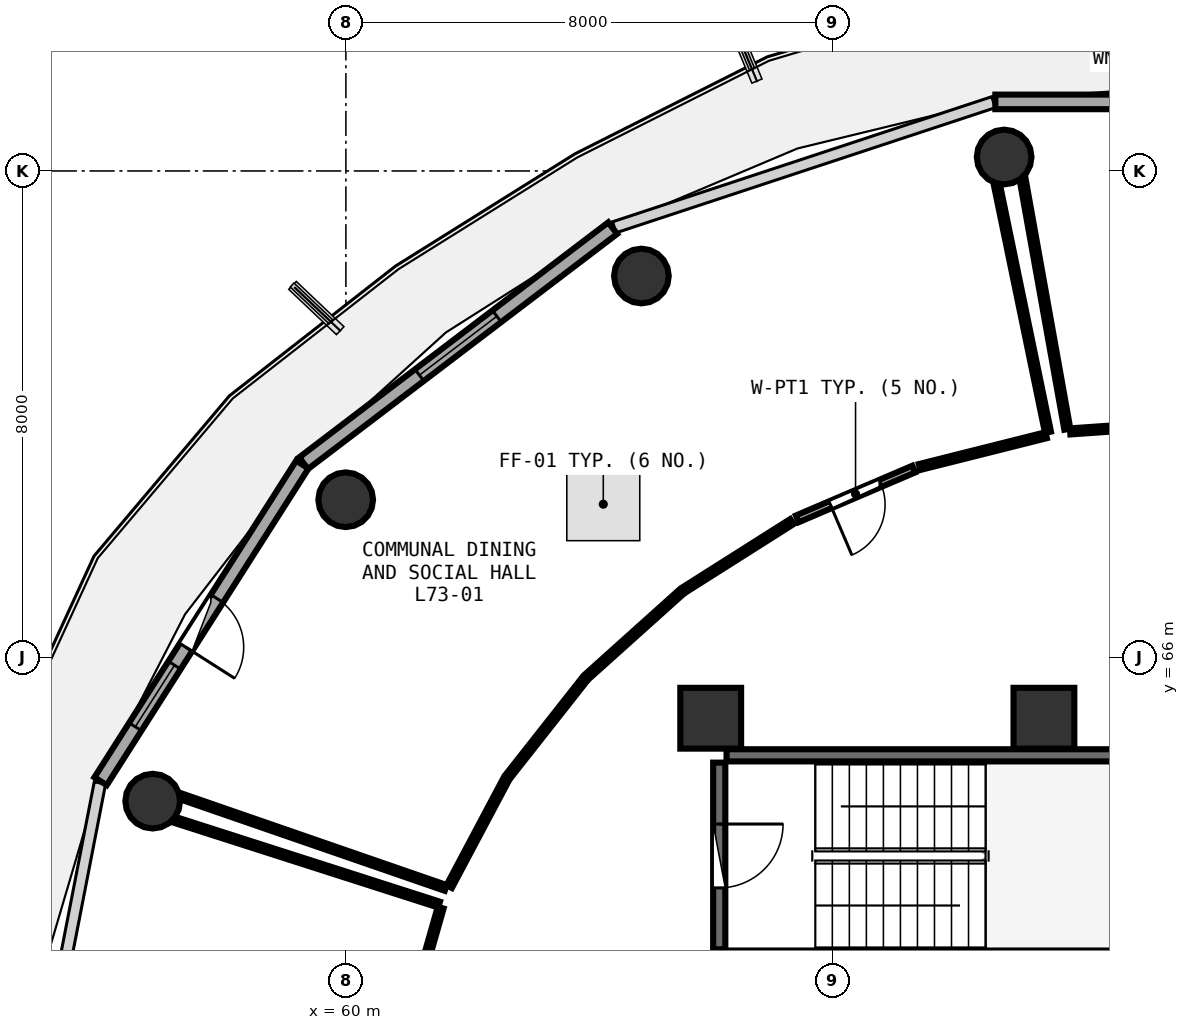
"""IFC4 building model, lengths in metres.
Left out: names, types, materials, properties, quantities, classifications, styles, units other than length and angle.
Written with IfcOpenShell. Run it as: python <this file> out.ifc"""

import sys

from ifc_helpers import new_model, si_unit, direction, frame, frame_2d, origin, origin_2d, place, context, subcontext, project, spatial, rectangle, circle, extrude, element, fill, save


model = new_model("IFC4")
c1 = context("Model", 3, precision=1e-05, world=origin(), true_north=direction((0.0, 1.0)))
c2 = subcontext(c1, "Body", "Model", "MODEL_VIEW")
j1 = project(units=[si_unit("LENGTHUNIT", "METRE"), si_unit("PLANEANGLEUNIT", "RADIAN")], contexts=[c1])
p1 = place(None, origin())
s1 = spatial("IfcSite", under=j1, at=p1, CompositionType="ELEMENT")
p2 = place(p1, origin())
s2 = spatial("IfcBuilding", under=s1, at=p2, CompositionType="ELEMENT")
p3 = place(p2, frame((0.0, 0.0, 286.2)))
s3 = spatial("IfcBuildingStorey", under=s2, at=p3, CompositionType="ELEMENT", Elevation=286.2)
for number, where, z_axis, x_axis in (
    (1, (71.48, 65.0, 0.0), (0.0, 0.0, 1.0), (1.0, 0.0, 0.0)),
    (2, (66.0, 65.0, 0.0), (0.0, 0.0, 1.0), (1.0, 0.0, 0.0)),
):
    element("IfcColumn", number, at=place(p3, frame(where, z_axis=z_axis, x_axis=x_axis)), inside=s3, PredefinedType="PILASTER", context=c2, shape_type="SweptSolid", body=[
        extrude(rectangle(XDim=1.0, YDim=1.0, at=origin_2d()), origin(), (0.0, 0.0, 1.0), 3.75),
    ])
for number, where, z_axis, x_axis in (
    (3, (70.826, 74.229, 0.0), (0.0, 0.0, 1.0), (1.0, 0.0, 0.0)),
    (4, (64.86, 72.272, 0.0), (0.0, 0.0, 1.0), (1.0, 0.0, 0.0)),
    (5, (59.997, 68.593, 0.0), (0.0, 0.0, 1.0), (1.0, 0.0, 0.0)),
    (6, (56.823, 63.636, 0.0), (0.0, 0.0, 1.0), (1.0, 0.0, 0.0)),
):
    element("IfcColumn", number, at=place(p3, frame(where, z_axis=z_axis, x_axis=x_axis)), inside=s3, PredefinedType="COLUMN", context=c2, shape_type="SweptSolid", body=[
        extrude(circle(Radius=0.45, at=origin_2d()), origin(), (0.0, 0.0, 1.0), 3.75),
    ])
p4 = place(p3, frame((77.319, 75.136, 0.0), z_axis=(0.0, 0.0, 1.0), x_axis=(-1.0, 0.0, 0.0)))
e7 = element("IfcWall", 7, at=p4, inside=s3, PredefinedType="SOLIDWALL", context=c2, shape_type="SweptSolid", body=[
    extrude(rectangle(XDim=6.638, YDim=0.24, at=frame_2d((3.319, 0.0))), origin(), (0.0, 0.0, 1.0), 3.475),
])
p5 = place(p4, frame((2.519, 0.0, 0.85)))
e8 = element("IfcOpeningElement", 8, at=p5, cuts=e7, PredefinedType="OPENING", context=c2, shape_type="SweptSolid", body=[
    extrude(rectangle(XDim=1.6, YDim=1.45, at=frame_2d((0.8, 0.725))), frame((0.0, 0.13, 0.0), z_axis=(0.0, -1.0, 0.0), x_axis=(1.0, 0.0, 0.0)), (0.0, 0.0, 1.0), 0.26),
])
p6 = place(p3, frame((64.388, 73.06, 0.0), z_axis=(0.0, 0.0, 1.0), x_axis=(-0.796010444211, -0.605282886514, 0.0)))
e9 = element("IfcWall", 9, at=p6, inside=s3, PredefinedType="SOLIDWALL", context=c2, shape_type="SweptSolid", body=[
    extrude(rectangle(XDim=6.387, YDim=0.24, at=frame_2d((3.194, 0.0))), origin(), (0.0, 0.0, 1.0), 3.475),
])
p7 = place(p6, frame((2.394, 0.0, 0.85)))
e10 = element("IfcOpeningElement", 10, at=p7, cuts=e9, PredefinedType="OPENING", context=c2, shape_type="SweptSolid", body=[
    extrude(rectangle(XDim=1.6, YDim=1.45, at=frame_2d((0.8, 0.725))), frame((0.0, 0.13, 0.0), z_axis=(0.0, -1.0, 0.0), x_axis=(1.0, 0.0, 0.0)), (0.0, 0.0, 1.0), 0.26),
])
p8 = place(p3, frame((59.284, 69.172, 0.0), z_axis=(0.0, 0.0, 1.0), x_axis=(-0.537271968456, -0.843409053728, 0.0)))
e11 = element("IfcWall", 11, at=p8, inside=s3, PredefinedType="SOLIDWALL", context=c2, shape_type="SweptSolid", body=[
    extrude(rectangle(XDim=6.175, YDim=0.24, at=frame_2d((3.087, 0.0))), origin(), (0.0, 0.0, 1.0), 3.475),
])
p9 = place(p8, frame((2.613, 0.0, 0.0)))
e12 = element("IfcOpeningElement", 12, at=p9, cuts=e11, PredefinedType="OPENING", context=c2, shape_type="SweptSolid", body=[
    extrude(rectangle(XDim=0.95, YDim=2.1, at=frame_2d((0.475, 1.05))), frame((0.0, 0.13, 0.0), z_axis=(0.0, -1.0, 0.0), x_axis=(1.0, 0.0, 0.0)), (0.0, 0.0, 1.0), 0.26),
])
p10 = place(p8, frame((3.913, 0.0, 0.85)))
e13 = element("IfcOpeningElement", 13, at=p10, cuts=e11, PredefinedType="OPENING", context=c2, shape_type="SweptSolid", body=[
    extrude(rectangle(XDim=1.2, YDim=1.45, at=frame_2d((0.6, 0.725))), frame((0.0, 0.13, 0.0), z_axis=(0.0, -1.0, 0.0), x_axis=(1.0, 0.0, 0.0)), (0.0, 0.0, 1.0), 0.26),
])
p11 = place(p3, frame((73.42, 64.39, 0.0), z_axis=(0.0, 0.0, 1.0), x_axis=(-1.0, 0.0, 0.0)))
e14 = element("IfcWall", 14, at=p11, inside=s3, PredefinedType="SHEAR", context=c2, shape_type="SweptSolid", body=[
    extrude(rectangle(XDim=7.16, YDim=0.2, at=frame_2d((3.58, 0.0))), origin(), (0.0, 0.0, 1.0), 3.49),
])
p12 = place(p3, frame((66.14, 64.27, 0.0), z_axis=(0.0, 0.0, 1.0), x_axis=(0.0, -1.0, 0.0)))
e15 = element("IfcWall", 15, at=p12, inside=s3, PredefinedType="SHEAR", context=c2, shape_type="SweptSolid", body=[
    extrude(rectangle(XDim=3.07, YDim=0.2, at=frame_2d((1.535, 0.0))), origin(), (0.0, 0.0, 1.0), 3.49),
])
p13 = place(p12, frame((1.01, 0.0, 0.0)))
e16 = element("IfcOpeningElement", 16, at=p13, cuts=e15, PredefinedType="OPENING", context=c2, shape_type="SweptSolid", body=[
    extrude(rectangle(XDim=1.05, YDim=2.1, at=frame_2d((0.525, 1.05))), frame((0.0, 0.11, 0.0), z_axis=(0.0, -1.0, 0.0), x_axis=(1.0, 0.0, 0.0)), (0.0, 0.0, 1.0), 0.22),
])
p14 = place(p3, frame((69.34, 69.097, 0.0), z_axis=(0.0, 0.0, 1.0), x_axis=(-0.919508345424, -0.39307048057, 0.0)))
e17 = element("IfcWall", 17, at=p14, inside=s3, PredefinedType="PARTITIONING", context=c2, shape_type="SweptSolid", body=[
    extrude(rectangle(XDim=2.083, YDim=0.12, at=frame_2d((1.042, 0.0))), origin(), (0.0, 0.0, 1.0), 3.48),
])
p15 = place(p14, frame((0.592, 0.0, 0.0)))
e18 = element("IfcOpeningElement", 18, at=p15, cuts=e17, PredefinedType="OPENING", context=c2, shape_type="SweptSolid", body=[
    extrude(rectangle(XDim=0.9, YDim=2.08, at=frame_2d((0.45, 1.04))), frame((0.0, 0.07, 0.0), z_axis=(0.0, -1.0, 0.0), x_axis=(1.0, 0.0, 0.0)), (0.0, 0.0, 1.0), 0.14),
])
p16 = place(p3, frame((71.516, 69.654, 0.0), z_axis=(0.0, 0.0, 1.0), x_axis=(-0.969827312174, -0.243792913272, 0.0)))
e19 = element("IfcWall", 19, at=p16, inside=s3, PredefinedType="PARTITIONING", context=c2, shape_type="SweptSolid", body=[
    extrude(rectangle(XDim=2.147, YDim=0.1, at=frame_2d((1.073, 0.0))), origin(), (0.0, 0.0, 1.0), 3.075),
])
p17 = place(p3, frame((67.335, 68.234, 0.0), z_axis=(0.0, 0.0, 1.0), x_axis=(-0.844856002064, -0.534993771717, 0.0)))
e20 = element("IfcWall", 20, at=p17, inside=s3, PredefinedType="PARTITIONING", context=c2, shape_type="SweptSolid", body=[
    extrude(rectangle(XDim=2.092, YDim=0.1, at=frame_2d((1.046, 0.0))), origin(), (0.0, 0.0, 1.0), 3.075),
])
p18 = place(p3, frame((65.504, 67.066, 0.0), z_axis=(0.0, 0.0, 1.0), x_axis=(-0.743943808924, -0.668242178527, 0.0)))
e21 = element("IfcWall", 21, at=p18, inside=s3, PredefinedType="PARTITIONING", context=c2, shape_type="SweptSolid", body=[
    extrude(rectangle(XDim=2.054, YDim=0.1, at=frame_2d((1.027, 0.0))), origin(), (0.0, 0.0, 1.0), 3.075),
])
p19 = place(p3, frame((63.921, 65.635, 0.0), z_axis=(0.0, 0.0, 1.0), x_axis=(-0.618820199788, -0.785532660259, 0.0)))
e22 = element("IfcWall", 22, at=p19, inside=s3, PredefinedType="PARTITIONING", context=c2, shape_type="SweptSolid", body=[
    extrude(rectangle(XDim=2.018, YDim=0.1, at=frame_2d((1.009, 0.0))), origin(), (0.0, 0.0, 1.0), 3.075),
])
p20 = place(p3, frame((62.629, 63.984, 0.0), z_axis=(0.0, 0.0, 1.0), x_axis=(-0.468933294906, -0.883233584579, 0.0)))
e23 = element("IfcWall", 23, at=p20, inside=s3, PredefinedType="PARTITIONING", context=c2, shape_type="SweptSolid", body=[
    extrude(rectangle(XDim=1.984, YDim=0.1, at=frame_2d((0.992, 0.0))), origin(), (0.0, 0.0, 1.0), 3.235),
])
p21 = place(p3, frame((61.642, 62.209, 0.0), z_axis=(0.0, 0.0, 1.0), x_axis=(-0.945103281494, 0.326771766388, 0.0)))
e24 = element("IfcWall", 24, at=p21, inside=s3, PredefinedType="PARTITIONING", context=c2, shape_type="SweptSolid", body=[
    extrude(rectangle(XDim=4.604, YDim=0.1, at=frame_2d((2.302, 0.0))), origin(), (0.0, 0.0, 1.0), 3.075),
])
p22 = place(p3, frame((70.707, 73.77, 0.0), z_axis=(0.0, 0.0, 1.0), x_axis=(0.202308141573, -0.979321916355, 0.0)))
e25 = element("IfcWall", 25, at=p22, inside=s3, PredefinedType="PARTITIONING", context=c2, shape_type="SweptSolid", body=[
    extrude(rectangle(XDim=4.153, YDim=0.1, at=frame_2d((2.076, 0.0))), origin(), (0.0, 0.0, 1.0), 3.075),
])
p23 = place(p3, frame((61.559, 61.885, 0.0), z_axis=(0.0, 0.0, 1.0), x_axis=(-0.274226302341, -0.961665188673, 0.0)))
e26 = element("IfcWall", 26, at=p23, inside=s3, PredefinedType="PARTITIONING", context=c2, shape_type="SweptSolid", body=[
    extrude(rectangle(XDim=1.955, YDim=0.1, at=frame_2d((0.978, 0.0))), origin(), (0.0, 0.0, 1.0), 3.48),
])
p24 = place(p3, frame((57.184, 63.329, 0.0), z_axis=(0.0, 0.0, 1.0), x_axis=(0.95227750557, -0.305233602976, 0.0)))
e27 = element("IfcWall", 27, at=p24, inside=s3, PredefinedType="PARTITIONING", context=c2, shape_type="SweptSolid", body=[
    extrude(rectangle(XDim=4.565, YDim=0.1, at=frame_2d((2.283, 0.0))), origin(), (0.0, 0.0, 1.0), 3.175),
])
p25 = place(p3, frame((74.067, 69.867, 0.0), z_axis=(0.0, 0.0, 1.0), x_axis=(-0.997574370957, -0.069608723664, 0.0)))
e28 = element("IfcWall", 28, at=p25, inside=s3, PredefinedType="PARTITIONING", context=c2, shape_type="SweptSolid", body=[
    extrude(rectangle(XDim=2.16, YDim=0.1, at=frame_2d((1.08, 0.0))), origin(), (0.0, 0.0, 1.0), 3.48),
])
p26 = place(p3, frame((71.865, 69.753, 0.0), z_axis=(0.0, 0.0, 1.0), x_axis=(-0.176199339585, 0.984354505618, 0.0)))
e29 = element("IfcWall", 29, at=p26, inside=s3, PredefinedType="PARTITIONING", context=c2, shape_type="SweptSolid", body=[
    extrude(rectangle(XDim=4.176, YDim=0.1, at=frame_2d((2.088, 0.0))), origin(), (0.0, 0.0, 1.0), 3.175),
])
p27 = place(p7, origin())
e30 = element("IfcWindow", 30, at=p27, inside=s3, PartitioningType="SINGLE_PANEL", PredefinedType="WINDOW", context=c2, shape_type="SweptSolid", body=[
    extrude(rectangle(XDim=1.6, YDim=1.45, at=frame_2d((0.8, 0.725))), frame((0.0, 0.03, 0.0), z_axis=(0.0, -1.0, 0.0), x_axis=(1.0, 0.0, 0.0)), (0.0, 0.0, 1.0), 0.06),
])
fill(e10, e30)
p28 = place(p9, frame((0.95, 0.0, 0.0), z_axis=(0.0, 0.0, 1.0), x_axis=(-1.0, 0.0, 0.0)))
e31 = element("IfcDoor", 31, at=p28, inside=s3, OperationType="SINGLE_SWING_LEFT", PredefinedType="DOOR", context=c2, shape_type="SweptSolid", body=[
    extrude(rectangle(XDim=0.95, YDim=2.1, at=frame_2d((0.475, 1.05))), frame((0.0, 0.025, 0.0), z_axis=(0.0, -1.0, 0.0), x_axis=(1.0, 0.0, 0.0)), (0.0, 0.0, 1.0), 0.05),
])
fill(e12, e31)
p29 = place(p10, origin())
e32 = element("IfcWindow", 32, at=p29, inside=s3, PartitioningType="SINGLE_PANEL", PredefinedType="WINDOW", context=c2, shape_type="SweptSolid", body=[
    extrude(rectangle(XDim=1.2, YDim=1.45, at=frame_2d((0.6, 0.725))), frame((0.0, 0.03, 0.0), z_axis=(0.0, -1.0, 0.0), x_axis=(1.0, 0.0, 0.0)), (0.0, 0.0, 1.0), 0.06),
])
fill(e13, e32)
p30 = place(p13, origin())
e33 = element("IfcDoor", 33, at=p30, inside=s3, OperationType="SINGLE_SWING_LEFT", PredefinedType="DOOR", context=c2, shape_type="SweptSolid", body=[
    extrude(rectangle(XDim=1.05, YDim=2.1, at=frame_2d((0.525, 1.05))), frame((0.0, 0.025, 0.0), z_axis=(0.0, -1.0, 0.0), x_axis=(1.0, 0.0, 0.0)), (0.0, 0.0, 1.0), 0.05),
])
fill(e16, e33)
p31 = place(p15, origin())
e34 = element("IfcDoor", 34, at=p31, inside=s3, OperationType="SINGLE_SWING_RIGHT", PredefinedType="DOOR", context=c2, shape_type="SweptSolid", body=[
    extrude(rectangle(XDim=0.9, YDim=2.08, at=frame_2d((0.45, 1.04))), frame((0.0, 0.025, 0.0), z_axis=(0.0, -1.0, 0.0), x_axis=(1.0, 0.0, 0.0)), (0.0, 0.0, 1.0), 0.05),
])
fill(e18, e34)
save(model, sys.argv[1])
